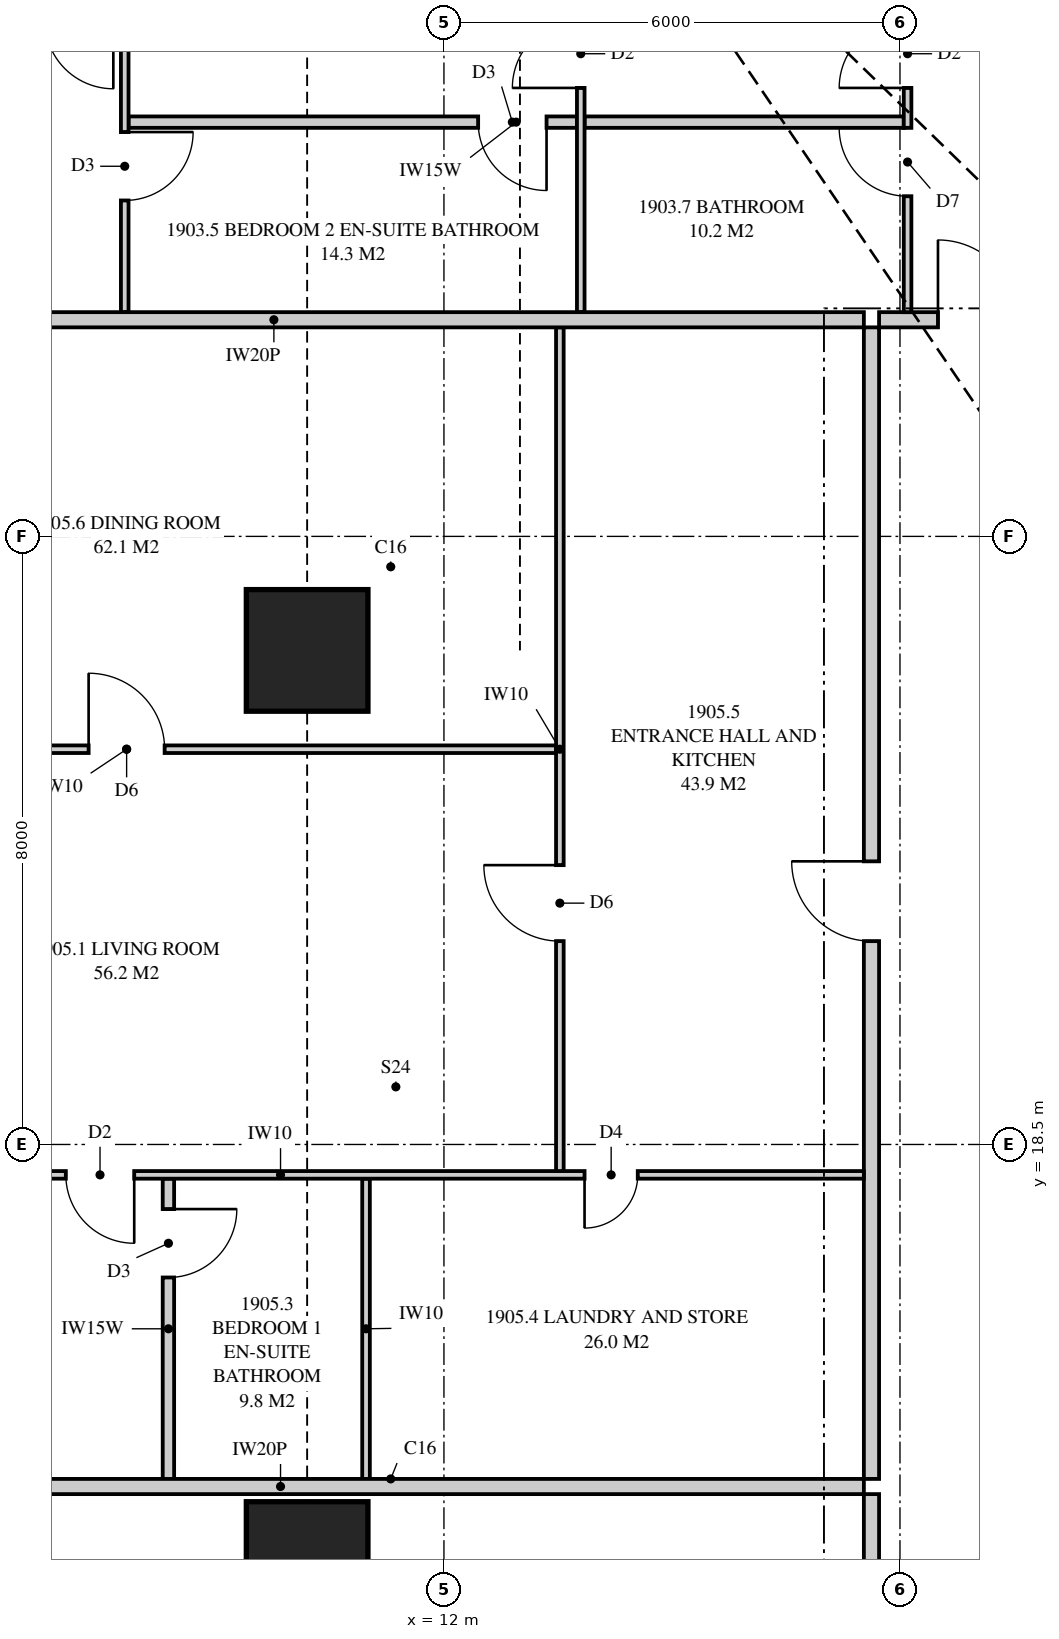
"""IFC4 building model, lengths in metres.
Left out: names, types, materials, properties, quantities, classifications, styles, units other than length and angle.
Written with IfcOpenShell. Run it as: python <this file> out.ifc"""

import sys

from ifc_helpers import new_model, si_unit, direction, frame, frame_2d, origin, origin_2d, place, context, subcontext, project, spatial, polyline, rectangle, outline, extrude, element, fill, save


model = new_model("IFC4")
c1 = context("Model", 3, precision=1e-05, world=origin(), true_north=direction((0.0, 1.0)))
c2 = subcontext(c1, "Body", "Model", "MODEL_VIEW")
j1 = project(units=[si_unit("LENGTHUNIT", "METRE"), si_unit("PLANEANGLEUNIT", "RADIAN")], contexts=[c1])
p1 = place(None, origin())
s1 = spatial("IfcSite", under=j1, at=p1, CompositionType="ELEMENT")
p2 = place(p1, origin())
s2 = spatial("IfcBuilding", under=s1, at=p2, CompositionType="ELEMENT")
p3 = place(p2, frame((0.0, 0.0, 71.25)))
s3 = spatial("IfcBuildingStorey", under=s2, at=p3, CompositionType="ELEMENT", Elevation=71.25)
for number, where, z_axis, x_axis in (
    (1, (10.2, 13.0, 0.0), (0.0, 0.0, 1.0), (1.0, 0.0, 0.0)),
    (2, (10.2, 25.0, 0.0), (0.0, 0.0, 1.0), (1.0, 0.0, 0.0)),
):
    element("IfcColumn", number, at=place(p3, frame(where, z_axis=z_axis, x_axis=x_axis)), inside=s3, PredefinedType="COLUMN", context=c2, shape_type="SweptSolid", body=[
        extrude(rectangle(XDim=1.6, YDim=1.6, at=origin_2d()), origin(), (0.0, 0.0, 1.0), 3.5),
    ])
p4 = place(p3, frame((17.725, 29.35, 0.0), z_axis=(0.0, 0.0, 1.0), x_axis=(1.0, 0.0, 0.0)))
e3 = element("IfcWall", 3, at=p4, inside=s3, PredefinedType="PARTITIONING", context=c2, shape_type="SweptSolid", body=[
    extrude(outline(polyline([(0.0, 0.0), (7.075, 0.0), (7.075, 3.22), (6.564, 3.22), (6.564, 2.694), (5.986, 2.694), (5.986, 3.22), (3.641, 3.22), (3.641, 2.641), (2.757, 2.641), (2.757, 3.22), (0.862, 3.22), (0.862, 2.641), (0.155, 2.641), (0.155, 3.22), (0.0, 3.22), (0.0, 0.0)])), frame((0.0, 0.1, 0.0), z_axis=(0.0, -1.0, 0.0), x_axis=(1.0, 0.0, 0.0)), (0.0, 0.0, 1.0), 0.2),
])
p5 = place(p4, frame((0.775, 0.0, 0.0)))
e4 = element("IfcOpeningElement", 4, at=p5, cuts=e3, PredefinedType="OPENING", context=c2, shape_type="SweptSolid", body=[
    extrude(rectangle(XDim=1.05, YDim=2.2, at=frame_2d((0.525, 1.1))), frame((0.0, 0.11, 0.0), z_axis=(0.0, -1.0, 0.0), x_axis=(1.0, 0.0, 0.0)), (0.0, 0.0, 1.0), 0.22),
])
p6 = place(p3, frame((7.8, 37.825, 0.0), z_axis=(0.0, 0.0, 1.0), x_axis=(0.0, -1.0, 0.0)))
e5 = element("IfcWall", 5, at=p6, inside=s3, PredefinedType="PARTITIONING", context=c2, shape_type="SweptSolid", body=[
    extrude(outline(polyline([(0.0, 0.0), (8.375, 0.0), (8.375, 3.22), (2.544, 3.22), (2.544, 2.1), (1.096, 2.1), (1.096, 3.22), (0.0, 3.22), (0.0, 0.0)])), frame((0.0, 0.05, 0.0), z_axis=(0.0, -1.0, 0.0), x_axis=(1.0, 0.0, 0.0)), (0.0, 0.0, 1.0), 0.1),
])
p7 = place(p6, frame((2.736, 0.0, 0.0)))
e6 = element("IfcOpeningElement", 6, at=p7, cuts=e5, PredefinedType="OPENING", context=c2, shape_type="SweptSolid", body=[
    extrude(rectangle(XDim=0.9, YDim=2.1, at=frame_2d((0.45, 1.05))), frame((0.0, 0.06, 0.0), z_axis=(0.0, -1.0, 0.0), x_axis=(1.0, 0.0, 0.0)), (0.0, 0.0, 1.0), 0.12),
])
p8 = place(p6, frame((6.006, 0.0, 0.0)))
e7 = element("IfcOpeningElement", 7, at=p8, cuts=e5, PredefinedType="OPENING", context=c2, shape_type="SweptSolid", body=[
    extrude(rectangle(XDim=0.9, YDim=2.1, at=frame_2d((0.45, 1.05))), frame((0.0, 0.06, 0.0), z_axis=(0.0, -1.0, 0.0), x_axis=(1.0, 0.0, 0.0)), (0.0, 0.0, 1.0), 0.12),
])
p9 = place(p3, frame((13.8, 37.825, 0.0), z_axis=(0.0, 0.0, 1.0), x_axis=(0.0, -1.0, 0.0)))
e8 = element("IfcWall", 8, at=p9, inside=s3, PredefinedType="PARTITIONING", context=c2, shape_type="SweptSolid", body=[
    extrude(outline(polyline([(8.375, 0.0), (8.375, 3.22), (2.446, 3.22), (2.446, 2.641), (1.485, 2.641), (1.485, 2.319), (1.475, 2.319), (1.475, 2.1), (1.021, 2.1), (1.021, 1.32), (0.529, 1.32), (0.529, 2.1), (0.075, 2.1), (0.075, 2.319), (0.0, 2.319), (0.0, 0.0), (8.375, 0.0)]), holes=[polyline([(0.529, 0.177), (0.529, 0.98), (1.021, 0.98), (1.021, 0.177), (0.529, 0.177)])]), frame((0.0, 0.05, 0.0), z_axis=(0.0, -1.0, 0.0), x_axis=(1.0, 0.0, 0.0)), (0.0, 0.0, 1.0), 0.1),
])
p10 = place(p9, frame((4.525, 0.0, 0.0)))
e9 = element("IfcOpeningElement", 9, at=p10, cuts=e8, PredefinedType="OPENING", context=c2, shape_type="SweptSolid", body=[
    extrude(rectangle(XDim=0.9, YDim=2.1, at=frame_2d((0.45, 1.05))), frame((0.0, 0.06, 0.0), z_axis=(0.0, -1.0, 0.0), x_axis=(1.0, 0.0, 0.0)), (0.0, 0.0, 1.0), 0.12),
])
p11 = place(p3, frame((18.1, 37.825, 0.0), z_axis=(0.0, 0.0, 1.0), x_axis=(0.0, -1.0, 0.0)))
e10 = element("IfcWall", 10, at=p11, inside=s3, PredefinedType="PARTITIONING", context=c2, shape_type="SweptSolid", body=[
    extrude(outline(polyline([(0.0, 0.0), (8.375, 0.0), (8.375, 2.641), (7.785, 2.641), (7.785, 3.22), (6.109, 3.22), (6.109, 2.641), (5.353, 2.641), (5.353, 3.22), (1.475, 3.22), (1.475, 2.1), (0.075, 2.1), (0.075, 3.22), (0.0, 3.22), (0.0, 0.0)])), frame((0.0, 0.05, 0.0), z_axis=(0.0, -1.0, 0.0), x_axis=(1.0, 0.0, 0.0)), (0.0, 0.0, 1.0), 0.1),
])
p12 = place(p11, frame((4.525, 0.0, 0.0)))
e11 = element("IfcOpeningElement", 11, at=p12, cuts=e10, PredefinedType="OPENING", context=c2, shape_type="SweptSolid", body=[
    extrude(rectangle(XDim=0.9, YDim=2.1, at=frame_2d((0.45, 1.05))), frame((0.0, 0.06, 0.0), z_axis=(0.0, -1.0, 0.0), x_axis=(1.0, 0.0, 0.0)), (0.0, 0.0, 1.0), 0.12),
])
p13 = place(p11, frame((5.95, 0.0, 0.0)))
e12 = element("IfcOpeningElement", 12, at=p13, cuts=e10, PredefinedType="OPENING", context=c2, shape_type="SweptSolid", body=[
    extrude(rectangle(XDim=0.9, YDim=2.1, at=frame_2d((0.45, 1.05))), frame((0.0, 0.06, 0.0), z_axis=(0.0, -1.0, 0.0), x_axis=(1.0, 0.0, 0.0)), (0.0, 0.0, 1.0), 0.12),
])
p14 = place(p3, frame((7.85, 31.95, 0.0), z_axis=(0.0, 0.0, 1.0), x_axis=(1.0, 0.0, 0.0)))
e13 = element("IfcWall", 13, at=p14, inside=s3, PredefinedType="PLUMBINGWALL", context=c2, shape_type="SweptSolid", body=[
    extrude(outline(polyline([(0.0, 0.0), (5.9, 0.0), (5.9, 3.22), (5.474, 3.22), (5.474, 2.621), (4.826, 2.621), (4.826, 3.22), (3.635, 3.22), (3.635, 2.62), (1.065, 2.62), (1.065, 3.22), (0.0, 3.22), (0.0, 0.0)])), frame((0.0, 0.075, 0.0), z_axis=(0.0, -1.0, 0.0), x_axis=(1.0, 0.0, 0.0)), (0.0, 0.0, 1.0), 0.15),
])
p15 = place(p14, frame((4.6, 0.0, 0.0)))
e14 = element("IfcOpeningElement", 14, at=p15, cuts=e13, PredefinedType="OPENING", context=c2, shape_type="SweptSolid", body=[
    extrude(rectangle(XDim=0.9, YDim=2.1, at=frame_2d((0.45, 1.05))), frame((0.0, 0.085, 0.0), z_axis=(0.0, -1.0, 0.0), x_axis=(1.0, 0.0, 0.0)), (0.0, 0.0, 1.0), 0.17),
])
p16 = place(p3, frame((13.85, 31.95, 0.0), z_axis=(0.0, 0.0, 1.0), x_axis=(1.0, 0.0, 0.0)))
e15 = element("IfcWall", 15, at=p16, inside=s3, PredefinedType="PLUMBINGWALL", context=c2, shape_type="SweptSolid", body=[
    extrude(outline(polyline([(0.0, 0.0), (4.2, 0.0), (4.2, 2.641), (3.982, 2.641), (3.982, 3.22), (2.953, 3.22), (2.953, 2.641), (2.28, 2.641), (2.28, 3.22), (0.0, 3.22), (0.0, 0.0)])), frame((0.0, 0.075, 0.0), z_axis=(0.0, -1.0, 0.0), x_axis=(1.0, 0.0, 0.0)), (0.0, 0.0, 1.0), 0.15),
])
p17 = place(p3, frame((2.0, 29.35, 0.0), z_axis=(0.0, 0.0, 1.0), x_axis=(1.0, 0.0, 0.0)))
e16 = element("IfcWall", 16, at=p17, inside=s3, PredefinedType="PARTITIONING", context=c2, shape_type="SweptSolid", body=[
    extrude(outline(polyline([(0.0, 0.0), (15.525, 0.0), (15.525, 3.22), (11.349, 3.22), (11.349, 2.621), (10.651, 2.621), (10.651, 3.22), (9.51, 3.22), (9.51, 2.62), (6.89, 2.62), (6.89, 3.22), (2.98, 3.22), (2.98, 2.621), (2.381, 2.621), (2.381, 2.1), (0.93, 2.1), (0.93, 3.22), (0.0, 3.22), (0.0, 0.0)])), frame((0.0, 0.1, 0.0), z_axis=(0.0, -1.0, 0.0), x_axis=(1.0, 0.0, 0.0)), (0.0, 0.0, 1.0), 0.2),
])
p18 = place(p3, frame((2.175, 14.0, 0.0), z_axis=(0.0, 0.0, 1.0), x_axis=(1.0, 0.0, 0.0)))
e17 = element("IfcWall", 17, at=p18, inside=s3, PredefinedType="PARTITIONING", context=c2, shape_type="SweptSolid", body=[
    extrude(outline(polyline([(0.075, 3.22), (0.0, 3.22), (0.0, 0.0), (0.529, 0.0), (0.529, 0.873), (1.021, 0.873), (1.021, 0.0), (15.35, 0.0), (15.35, 3.22), (9.335, 3.22), (9.335, 2.62), (6.715, 2.62), (6.715, 3.22), (1.475, 3.22), (1.475, 2.1), (1.021, 2.1), (1.021, 1.427), (0.529, 1.427), (0.529, 2.1), (0.075, 2.1), (0.075, 3.22)])), frame((0.0, 0.1, 0.0), z_axis=(0.0, -1.0, 0.0), x_axis=(1.0, 0.0, 0.0)), (0.0, 0.0, 1.0), 0.2),
])
p19 = place(p3, frame((17.625, 7.75, 0.0), z_axis=(0.0, 0.0, 1.0), x_axis=(0.0, 1.0, 0.0)))
e18 = element("IfcWall", 18, at=p19, inside=s3, PredefinedType="PARTITIONING", context=c2, shape_type="SweptSolid", body=[
    extrude(outline(polyline([(0.0, 0.0), (6.15, 0.0), (6.15, 3.22), (5.75, 3.22), (5.75, 2.22), (4.75, 2.22), (4.75, 3.22), (0.0, 3.22), (0.0, 0.0)])), frame((0.0, 0.1, 0.0), z_axis=(0.0, -1.0, 0.0), x_axis=(1.0, 0.0, 0.0)), (0.0, 0.0, 1.0), 0.2),
])
p20 = place(p19, frame((2.175, 0.0, 0.0)))
e19 = element("IfcOpeningElement", 19, at=p20, cuts=e18, PredefinedType="OPENING", context=c2, shape_type="SweptSolid", body=[
    extrude(rectangle(XDim=1.8, YDim=2.1, at=frame_2d((0.9, 1.05))), frame((0.0, 0.11, 0.0), z_axis=(0.0, -1.0, 0.0), x_axis=(1.0, 0.0, 0.0)), (0.0, 0.0, 1.0), 0.22),
])
p21 = place(p3, frame((17.625, 14.1, 0.0), z_axis=(0.0, 0.0, 1.0), x_axis=(0.0, 1.0, 0.0)))
e20 = element("IfcWall", 20, at=p21, inside=s3, PredefinedType="PARTITIONING", context=c2, shape_type="SweptSolid", body=[
    extrude(outline(polyline([(0.0, 0.0), (15.15, 0.0), (15.15, 3.22), (11.4, 3.22), (11.4, 2.22), (10.4, 2.22), (10.4, 3.22), (0.0, 3.22), (0.0, 0.0)])), frame((0.0, 0.1, 0.0), z_axis=(0.0, -1.0, 0.0), x_axis=(1.0, 0.0, 0.0)), (0.0, 0.0, 1.0), 0.2),
])
p22 = place(p21, frame((7.075, 0.0, 0.0)))
e21 = element("IfcOpeningElement", 21, at=p22, cuts=e20, PredefinedType="OPENING", context=c2, shape_type="SweptSolid", body=[
    extrude(rectangle(XDim=1.05, YDim=2.2, at=frame_2d((0.525, 1.1))), frame((0.0, 0.11, 0.0), z_axis=(0.0, -1.0, 0.0), x_axis=(1.0, 0.0, 0.0)), (0.0, 0.0, 1.0), 0.22),
])
p23 = place(p3, frame((2.175, 18.1, 0.0), z_axis=(0.0, 0.0, 1.0), x_axis=(1.0, 0.0, 0.0)))
e22 = element("IfcWall", 22, at=p23, inside=s3, PredefinedType="PARTITIONING", context=c2, shape_type="SweptSolid", body=[
    extrude(outline(polyline([(0.0, 0.0), (15.35, 0.0), (15.35, 3.22), (9.285, 3.22), (9.285, 2.62), (6.765, 2.62), (6.765, 3.22), (1.475, 3.22), (1.475, 2.1), (0.075, 2.1), (0.075, 3.22), (0.0, 3.22), (0.0, 0.0)])), frame((0.0, 0.05, 0.0), z_axis=(0.0, -1.0, 0.0), x_axis=(1.0, 0.0, 0.0)), (0.0, 0.0, 1.0), 0.1),
])
p24 = place(p23, frame((4.85, 0.0, 0.0)))
e23 = element("IfcOpeningElement", 23, at=p24, cuts=e22, PredefinedType="OPENING", context=c2, shape_type="SweptSolid", body=[
    extrude(rectangle(XDim=0.9, YDim=2.1, at=frame_2d((0.45, 1.05))), frame((0.0, 0.06, 0.0), z_axis=(0.0, -1.0, 0.0), x_axis=(1.0, 0.0, 0.0)), (0.0, 0.0, 1.0), 0.12),
])
p25 = place(p23, frame((11.675, 0.0, 0.0)))
e24 = element("IfcOpeningElement", 24, at=p25, cuts=e22, PredefinedType="OPENING", context=c2, shape_type="SweptSolid", body=[
    extrude(rectangle(XDim=0.7, YDim=2.1, at=frame_2d((0.35, 1.05))), frame((0.0, 0.06, 0.0), z_axis=(0.0, -1.0, 0.0), x_axis=(1.0, 0.0, 0.0)), (0.0, 0.0, 1.0), 0.12),
])
p26 = place(p3, frame((8.375, 14.1, 0.0), z_axis=(0.0, 0.0, 1.0), x_axis=(0.0, 1.0, 0.0)))
e25 = element("IfcWall", 25, at=p26, inside=s3, PredefinedType="PLUMBINGWALL", context=c2, shape_type="SweptSolid", body=[
    extrude(rectangle(XDim=3.95, YDim=0.15, at=frame_2d((1.975, 0.0))), origin(), (0.0, 0.0, 1.0), 3.22),
])
p27 = place(p26, frame((2.65, 0.0, 0.0)))
e26 = element("IfcOpeningElement", 26, at=p27, cuts=e25, PredefinedType="OPENING", context=c2, shape_type="SweptSolid", body=[
    extrude(rectangle(XDim=0.9, YDim=2.1, at=frame_2d((0.45, 1.05))), frame((0.0, 0.085, 0.0), z_axis=(0.0, -1.0, 0.0), x_axis=(1.0, 0.0, 0.0)), (0.0, 0.0, 1.0), 0.17),
])
p28 = place(p3, frame((10.975, 14.1, 0.0), z_axis=(0.0, 0.0, 1.0), x_axis=(0.0, 1.0, 0.0)))
e27 = element("IfcWall", 27, at=p28, inside=s3, PredefinedType="PARTITIONING", context=c2, shape_type="SweptSolid", body=[
    extrude(outline(polyline([(0.0, 0.0), (3.95, 0.0), (3.95, 3.22), (3.95, 2.62), (0.0, 2.62), (0.0, 3.22), (0.0, 0.0)])), frame((0.0, 0.05, 0.0), z_axis=(0.0, -1.0, 0.0), x_axis=(1.0, 0.0, 0.0)), (0.0, 0.0, 1.0), 0.1),
])
p29 = place(p3, frame((13.525, 18.15, 0.0), z_axis=(0.0, 0.0, 1.0), x_axis=(0.0, 1.0, 0.0)))
e28 = element("IfcWall", 28, at=p29, inside=s3, PredefinedType="PARTITIONING", context=c2, shape_type="SweptSolid", body=[
    extrude(outline(polyline([(0.0, 0.0), (11.1, 0.0), (11.1, 3.22), (7.35, 3.22), (7.35, 2.22), (6.35, 2.22), (6.35, 3.22), (0.0, 3.22), (0.0, 0.0)])), frame((0.0, 0.05, 0.0), z_axis=(0.0, -1.0, 0.0), x_axis=(1.0, 0.0, 0.0)), (0.0, 0.0, 1.0), 0.1),
])
p30 = place(p29, frame((3.025, 0.0, 0.0)))
e29 = element("IfcOpeningElement", 29, at=p30, cuts=e28, PredefinedType="OPENING", context=c2, shape_type="SweptSolid", body=[
    extrude(rectangle(XDim=1.0, YDim=2.1, at=frame_2d((0.5, 1.05))), frame((0.0, 0.06, 0.0), z_axis=(0.0, -1.0, 0.0), x_axis=(1.0, 0.0, 0.0)), (0.0, 0.0, 1.0), 0.12),
])
p31 = place(p3, frame((2.175, 23.7, 0.0), z_axis=(0.0, 0.0, 1.0), x_axis=(1.0, 0.0, 0.0)))
e30 = element("IfcWall", 30, at=p31, inside=s3, PredefinedType="PARTITIONING", context=c2, shape_type="SweptSolid", body=[
    extrude(outline(polyline([(0.075, 3.22), (0.0, 3.22), (0.0, 0.0), (0.529, 0.0), (0.529, 0.623), (1.021, 0.623), (1.021, 0.0), (11.3, 0.0), (11.3, 3.22), (9.285, 3.22), (9.285, 2.62), (6.765, 2.62), (6.765, 3.22), (1.72, 3.22), (1.72, 2.623), (1.7, 2.576), (1.475, 2.562), (1.475, 2.1), (1.021, 2.1), (1.021, 1.677), (0.529, 1.677), (0.529, 2.1), (0.075, 2.1), (0.075, 3.22)])), frame((0.0, 0.05, 0.0), z_axis=(0.0, -1.0, 0.0), x_axis=(1.0, 0.0, 0.0)), (0.0, 0.0, 1.0), 0.1),
])
p32 = place(p31, frame((5.15, 0.0, 0.0)))
e31 = element("IfcOpeningElement", 31, at=p32, cuts=e30, PredefinedType="OPENING", context=c2, shape_type="SweptSolid", body=[
    extrude(rectangle(XDim=1.0, YDim=2.1, at=frame_2d((0.5, 1.05))), frame((0.0, 0.06, 0.0), z_axis=(0.0, -1.0, 0.0), x_axis=(1.0, 0.0, 0.0)), (0.0, 0.0, 1.0), 0.12),
])
p33 = place(p5, origin())
e32 = element("IfcDoor", 32, at=p33, inside=s3, OperationType="SINGLE_SWING_LEFT", PredefinedType="DOOR", context=c2, shape_type="SweptSolid", body=[
    extrude(rectangle(XDim=1.05, YDim=2.2, at=frame_2d((0.525, 1.1))), frame((0.0, 0.025, 0.0), z_axis=(0.0, -1.0, 0.0), x_axis=(1.0, 0.0, 0.0)), (0.0, 0.0, 1.0), 0.05),
])
fill(e4, e32)
p34 = place(p10, frame((0.9, 0.0, 0.0), z_axis=(0.0, 0.0, 1.0), x_axis=(-1.0, 0.0, 0.0)))
e33 = element("IfcDoor", 33, at=p34, inside=s3, OperationType="SINGLE_SWING_LEFT", PredefinedType="DOOR", context=c2, shape_type="SweptSolid", body=[
    extrude(rectangle(XDim=0.9, YDim=2.1, at=frame_2d((0.45, 1.05))), frame((0.0, 0.025, 0.0), z_axis=(0.0, -1.0, 0.0), x_axis=(1.0, 0.0, 0.0)), (0.0, 0.0, 1.0), 0.05),
])
fill(e9, e33)
p35 = place(p15, frame((0.9, 0.0, 0.0), z_axis=(0.0, 0.0, 1.0), x_axis=(-1.0, 0.0, 0.0)))
e34 = element("IfcDoor", 34, at=p35, inside=s3, OperationType="SINGLE_SWING_LEFT", PredefinedType="DOOR", context=c2, shape_type="SweptSolid", body=[
    extrude(rectangle(XDim=0.9, YDim=2.1, at=frame_2d((0.45, 1.05))), frame((0.0, 0.025, 0.0), z_axis=(0.0, -1.0, 0.0), x_axis=(1.0, 0.0, 0.0)), (0.0, 0.0, 1.0), 0.05),
])
fill(e14, e34)
p36 = place(p12, frame((0.9, 0.0, 0.0), z_axis=(0.0, 0.0, 1.0), x_axis=(-1.0, 0.0, 0.0)))
e35 = element("IfcDoor", 35, at=p36, inside=s3, OperationType="SINGLE_SWING_LEFT", PredefinedType="DOOR", context=c2, shape_type="SweptSolid", body=[
    extrude(rectangle(XDim=0.9, YDim=2.1, at=frame_2d((0.45, 1.05))), frame((0.0, 0.025, 0.0), z_axis=(0.0, -1.0, 0.0), x_axis=(1.0, 0.0, 0.0)), (0.0, 0.0, 1.0), 0.05),
])
fill(e11, e35)
p37 = place(p13, frame((0.9, 0.0, 0.0), z_axis=(0.0, 0.0, 1.0), x_axis=(-1.0, 0.0, 0.0)))
e36 = element("IfcDoor", 36, at=p37, inside=s3, OperationType="SINGLE_SWING_RIGHT", PredefinedType="DOOR", context=c2, shape_type="SweptSolid", body=[
    extrude(rectangle(XDim=0.9, YDim=2.1, at=frame_2d((0.45, 1.05))), frame((0.0, 0.025, 0.0), z_axis=(0.0, -1.0, 0.0), x_axis=(1.0, 0.0, 0.0)), (0.0, 0.0, 1.0), 0.05),
])
fill(e12, e36)
p38 = place(p8, origin())
e37 = element("IfcDoor", 37, at=p38, inside=s3, OperationType="SINGLE_SWING_LEFT", PredefinedType="DOOR", context=c2, shape_type="SweptSolid", body=[
    extrude(rectangle(XDim=0.9, YDim=2.1, at=frame_2d((0.45, 1.05))), frame((0.0, 0.025, 0.0), z_axis=(0.0, -1.0, 0.0), x_axis=(1.0, 0.0, 0.0)), (0.0, 0.0, 1.0), 0.05),
])
fill(e7, e37)
p39 = place(p22, origin())
e38 = element("IfcDoor", 38, at=p39, inside=s3, OperationType="SINGLE_SWING_RIGHT", PredefinedType="DOOR", context=c2, shape_type="SweptSolid", body=[
    extrude(rectangle(XDim=1.05, YDim=2.2, at=frame_2d((0.525, 1.1))), frame((0.0, 0.025, 0.0), z_axis=(0.0, -1.0, 0.0), x_axis=(1.0, 0.0, 0.0)), (0.0, 0.0, 1.0), 0.05),
])
fill(e21, e38)
p40 = place(p24, frame((0.9, 0.0, 0.0), z_axis=(0.0, 0.0, 1.0), x_axis=(-1.0, 0.0, 0.0)))
e39 = element("IfcDoor", 39, at=p40, inside=s3, OperationType="SINGLE_SWING_LEFT", PredefinedType="DOOR", context=c2, shape_type="SweptSolid", body=[
    extrude(rectangle(XDim=0.9, YDim=2.1, at=frame_2d((0.45, 1.05))), frame((0.0, 0.025, 0.0), z_axis=(0.0, -1.0, 0.0), x_axis=(1.0, 0.0, 0.0)), (0.0, 0.0, 1.0), 0.05),
])
fill(e23, e39)
p41 = place(p27, frame((0.9, 0.0, 0.0), z_axis=(0.0, 0.0, 1.0), x_axis=(-1.0, 0.0, 0.0)))
e40 = element("IfcDoor", 40, at=p41, inside=s3, OperationType="SINGLE_SWING_LEFT", PredefinedType="DOOR", context=c2, shape_type="SweptSolid", body=[
    extrude(rectangle(XDim=0.9, YDim=2.1, at=frame_2d((0.45, 1.05))), frame((0.0, 0.025, 0.0), z_axis=(0.0, -1.0, 0.0), x_axis=(1.0, 0.0, 0.0)), (0.0, 0.0, 1.0), 0.05),
])
fill(e26, e40)
p42 = place(p25, frame((0.7, 0.0, 0.0), z_axis=(0.0, 0.0, 1.0), x_axis=(-1.0, 0.0, 0.0)))
e41 = element("IfcDoor", 41, at=p42, inside=s3, OperationType="SINGLE_SWING_RIGHT", PredefinedType="DOOR", context=c2, shape_type="SweptSolid", body=[
    extrude(rectangle(XDim=0.7, YDim=2.1, at=frame_2d((0.35, 1.05))), frame((0.0, 0.025, 0.0), z_axis=(0.0, -1.0, 0.0), x_axis=(1.0, 0.0, 0.0)), (0.0, 0.0, 1.0), 0.05),
])
fill(e24, e41)
p43 = place(p30, origin())
e42 = element("IfcDoor", 42, at=p43, inside=s3, OperationType="SINGLE_SWING_RIGHT", PredefinedType="DOOR", context=c2, shape_type="SweptSolid", body=[
    extrude(rectangle(XDim=1.0, YDim=2.1, at=frame_2d((0.5, 1.05))), frame((0.0, 0.025, 0.0), z_axis=(0.0, -1.0, 0.0), x_axis=(1.0, 0.0, 0.0)), (0.0, 0.0, 1.0), 0.05),
])
fill(e29, e42)
p44 = place(p32, origin())
e43 = element("IfcDoor", 43, at=p44, inside=s3, OperationType="SINGLE_SWING_LEFT", PredefinedType="DOOR", context=c2, shape_type="SweptSolid", body=[
    extrude(rectangle(XDim=1.0, YDim=2.1, at=frame_2d((0.5, 1.05))), frame((0.0, 0.025, 0.0), z_axis=(0.0, -1.0, 0.0), x_axis=(1.0, 0.0, 0.0)), (0.0, 0.0, 1.0), 0.05),
])
fill(e31, e43)
save(model, sys.argv[1])
